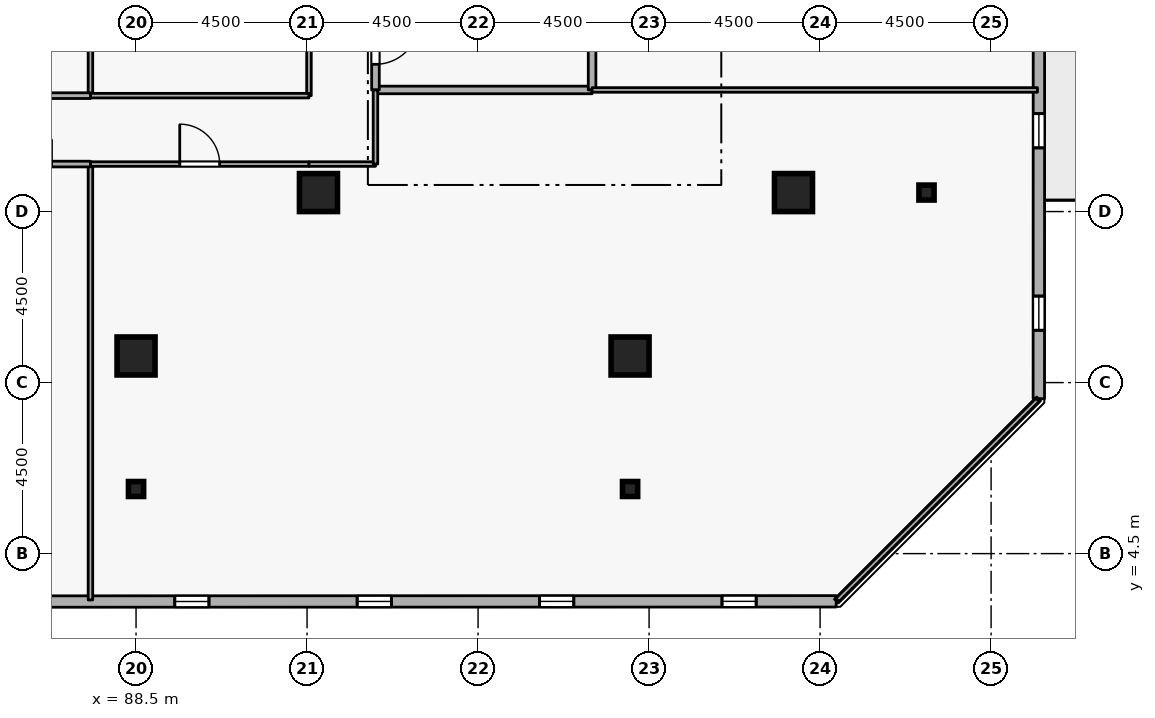
"""IFC4 building model, lengths in metres.
Left out: names, types, materials, properties, quantities, classifications, styles, units other than length and angle.
Written with IfcOpenShell. Run it as: python <this file> out.ifc"""

import sys

from ifc_helpers import new_model, si_unit, direction, frame, frame_2d, origin, origin_2d, place, context, subcontext, project, spatial, rectangle, i_section, extrude, element, fill, save


model = new_model("IFC4")
c1 = context("Model", 3, precision=1e-05, world=origin(), true_north=direction((0.0, 1.0)))
c2 = subcontext(c1, "Body", "Model", "MODEL_VIEW")
j1 = project(units=[si_unit("LENGTHUNIT", "METRE"), si_unit("PLANEANGLEUNIT", "RADIAN")], contexts=[c1])
p1 = place(None, origin())
s1 = spatial("IfcSite", under=j1, at=p1, CompositionType="ELEMENT")
p2 = place(p1, origin())
s2 = spatial("IfcBuilding", under=s1, at=p2, CompositionType="ELEMENT")
p3 = place(p2, frame((0.0, 0.0, 240.3)))
s3 = spatial("IfcBuildingStorey", under=s2, at=p3, CompositionType="ELEMENT", Elevation=240.3)
for number, where, z_axis, x_axis in (
    (1, (105.8, 14.0, 0.0), (0.0, 0.0, 1.0), (1.0, 0.0, 0.0)),
    (2, (101.5, 9.7, 0.0), (0.0, 0.0, 1.0), (1.0, 0.0, 0.0)),
    (3, (88.5, 9.7, 0.0), (0.0, 0.0, 1.0), (1.0, 0.0, 0.0)),
    (4, (93.3, 14.0, 0.0), (0.0, 0.0, 1.0), (1.0, 0.0, 0.0)),
):
    element("IfcColumn", number, at=place(p3, frame(where, z_axis=z_axis, x_axis=x_axis)), inside=s3, PredefinedType="COLUMN", context=c2, shape_type="SweptSolid", body=[
        extrude(rectangle(XDim=1.0, YDim=1.0, at=origin_2d()), origin(), (0.0, 0.0, 1.0), 3.6),
    ])
for number, where, z_axis, x_axis in (
    (5, (109.3, 14.0, 0.0), (0.0, 0.0, 1.0), (1.0, 0.0, 0.0)),
    (6, (101.5, 6.2, 0.0), (0.0, 0.0, 1.0), (1.0, 0.0, 0.0)),
    (7, (88.5, 6.2, 0.0), (0.0, 0.0, 1.0), (1.0, 0.0, 0.0)),
):
    element("IfcColumn", number, at=place(p3, frame(where, z_axis=z_axis, x_axis=x_axis)), inside=s3, PredefinedType="COLUMN", context=c2, shape_type="SweptSolid", body=[
        extrude(i_section(OverallWidth=0.399, OverallDepth=0.394, WebThickness=0.023, FlangeThickness=0.037, FilletRadius=0.015, at=origin_2d()), origin(), (0.0, 0.0, 1.0), 3.6),
    ])
p4 = place(p3, frame((73.319, 3.235, 0.0), z_axis=(0.0, 0.0, 1.0), x_axis=(0.999999963872, 0.000268805477, 0.0)))
e8 = element("IfcWall", 8, at=p4, inside=s3, PredefinedType="STANDARD", context=c2, shape_type="SweptSolid", body=[
    extrude(rectangle(XDim=33.605, YDim=0.3, at=frame_2d((16.802, 0.0))), origin(), (0.0, 0.0, 1.0), 2.7),
])
p5 = place(p4, frame((1.8, 0.0, 0.72)))
e9 = element("IfcOpeningElement", 9, at=p5, cuts=e8, PredefinedType="OPENING", context=c2, shape_type="SweptSolid", body=[
    extrude(rectangle(XDim=0.9, YDim=1.75, at=frame_2d((0.45, 0.875))), frame((0.0, 0.16, 0.0), z_axis=(0.0, -1.0, 0.0), x_axis=(1.0, 0.0, 0.0)), (0.0, 0.0, 1.0), 0.32),
])
p6 = place(p4, frame((6.6, 0.0, 0.72)))
e10 = element("IfcOpeningElement", 10, at=p6, cuts=e8, PredefinedType="OPENING", context=c2, shape_type="SweptSolid", body=[
    extrude(rectangle(XDim=0.9, YDim=1.75, at=frame_2d((0.45, 0.875))), frame((0.0, 0.16, 0.0), z_axis=(0.0, -1.0, 0.0), x_axis=(1.0, 0.0, 0.0)), (0.0, 0.0, 1.0), 0.32),
])
p7 = place(p4, frame((11.4, 0.0, 0.72)))
e11 = element("IfcOpeningElement", 11, at=p7, cuts=e8, PredefinedType="OPENING", context=c2, shape_type="SweptSolid", body=[
    extrude(rectangle(XDim=0.9, YDim=1.75, at=frame_2d((0.45, 0.875))), frame((0.0, 0.16, 0.0), z_axis=(0.0, -1.0, 0.0), x_axis=(1.0, 0.0, 0.0)), (0.0, 0.0, 1.0), 0.32),
])
p8 = place(p4, frame((16.2, 0.0, 0.72)))
e12 = element("IfcOpeningElement", 12, at=p8, cuts=e8, PredefinedType="OPENING", context=c2, shape_type="SweptSolid", body=[
    extrude(rectangle(XDim=0.9, YDim=1.75, at=frame_2d((0.45, 0.875))), frame((0.0, 0.16, 0.0), z_axis=(0.0, -1.0, 0.0), x_axis=(1.0, 0.0, 0.0)), (0.0, 0.0, 1.0), 0.32),
])
p9 = place(p4, frame((21.0, 0.0, 0.72)))
e13 = element("IfcOpeningElement", 13, at=p9, cuts=e8, PredefinedType="OPENING", context=c2, shape_type="SweptSolid", body=[
    extrude(rectangle(XDim=0.9, YDim=1.75, at=frame_2d((0.45, 0.875))), frame((0.0, 0.16, 0.0), z_axis=(0.0, -1.0, 0.0), x_axis=(1.0, 0.0, 0.0)), (0.0, 0.0, 1.0), 0.32),
])
p10 = place(p4, frame((25.8, 0.0, 0.72)))
e14 = element("IfcOpeningElement", 14, at=p10, cuts=e8, PredefinedType="OPENING", context=c2, shape_type="SweptSolid", body=[
    extrude(rectangle(XDim=0.9, YDim=1.75, at=frame_2d((0.45, 0.875))), frame((0.0, 0.16, 0.0), z_axis=(0.0, -1.0, 0.0), x_axis=(1.0, 0.0, 0.0)), (0.0, 0.0, 1.0), 0.32),
])
p11 = place(p4, frame((30.6, 0.0, 0.72)))
e15 = element("IfcOpeningElement", 15, at=p11, cuts=e8, PredefinedType="OPENING", context=c2, shape_type="SweptSolid", body=[
    extrude(rectangle(XDim=0.9, YDim=1.75, at=frame_2d((0.45, 0.875))), frame((0.0, 0.16, 0.0), z_axis=(0.0, -1.0, 0.0), x_axis=(1.0, 0.0, 0.0)), (0.0, 0.0, 1.0), 0.32),
])
p12 = place(p3, frame((112.256, 8.576, 0.0), z_axis=(0.0, 0.0, 1.0), x_axis=(0.000268805477, 0.999999963872, 0.0)))
e16 = element("IfcWall", 16, at=p12, inside=s3, PredefinedType="STANDARD", context=c2, shape_type="SweptSolid", body=[
    extrude(rectangle(XDim=33.605, YDim=0.3, at=frame_2d((16.802, 0.0))), origin(), (0.0, 0.0, 1.0), 2.7),
])
p13 = place(p12, frame((26.702, 0.0, 0.0)))
e17 = element("IfcOpeningElement", 17, at=p13, cuts=e16, PredefinedType="OPENING", context=c2, shape_type="SweptSolid", body=[
    extrude(rectangle(XDim=1.0, YDim=2.08, at=frame_2d((0.5, 1.04))), frame((0.0, 0.16, 0.0), z_axis=(0.0, -1.0, 0.0), x_axis=(1.0, 0.0, 0.0)), (0.0, 0.0, 1.0), 0.32),
])
p14 = place(p12, frame((1.8, 0.0, 0.72)))
e18 = element("IfcOpeningElement", 18, at=p14, cuts=e16, PredefinedType="OPENING", context=c2, shape_type="SweptSolid", body=[
    extrude(rectangle(XDim=0.9, YDim=1.75, at=frame_2d((0.45, 0.875))), frame((0.0, 0.16, 0.0), z_axis=(0.0, -1.0, 0.0), x_axis=(1.0, 0.0, 0.0)), (0.0, 0.0, 1.0), 0.32),
])
p15 = place(p12, frame((6.6, 0.0, 0.72)))
e19 = element("IfcOpeningElement", 19, at=p15, cuts=e16, PredefinedType="OPENING", context=c2, shape_type="SweptSolid", body=[
    extrude(rectangle(XDim=0.9, YDim=1.75, at=frame_2d((0.45, 0.875))), frame((0.0, 0.16, 0.0), z_axis=(0.0, -1.0, 0.0), x_axis=(1.0, 0.0, 0.0)), (0.0, 0.0, 1.0), 0.32),
])
p16 = place(p12, frame((11.4, 0.0, 0.72)))
e20 = element("IfcOpeningElement", 20, at=p16, cuts=e16, PredefinedType="OPENING", context=c2, shape_type="SweptSolid", body=[
    extrude(rectangle(XDim=0.9, YDim=1.75, at=frame_2d((0.45, 0.875))), frame((0.0, 0.16, 0.0), z_axis=(0.0, -1.0, 0.0), x_axis=(1.0, 0.0, 0.0)), (0.0, 0.0, 1.0), 0.32),
])
p17 = place(p12, frame((16.2, 0.0, 0.72)))
e21 = element("IfcOpeningElement", 21, at=p17, cuts=e16, PredefinedType="OPENING", context=c2, shape_type="SweptSolid", body=[
    extrude(rectangle(XDim=0.9, YDim=1.75, at=frame_2d((0.45, 0.875))), frame((0.0, 0.16, 0.0), z_axis=(0.0, -1.0, 0.0), x_axis=(1.0, 0.0, 0.0)), (0.0, 0.0, 1.0), 0.32),
])
p18 = place(p12, frame((21.0, 0.0, 0.72)))
e22 = element("IfcOpeningElement", 22, at=p18, cuts=e16, PredefinedType="OPENING", context=c2, shape_type="SweptSolid", body=[
    extrude(rectangle(XDim=0.9, YDim=1.75, at=frame_2d((0.45, 0.875))), frame((0.0, 0.16, 0.0), z_axis=(0.0, -1.0, 0.0), x_axis=(1.0, 0.0, 0.0)), (0.0, 0.0, 1.0), 0.32),
])
p19 = place(p12, frame((30.6, 0.0, 0.72)))
e23 = element("IfcOpeningElement", 23, at=p19, cuts=e16, PredefinedType="OPENING", context=c2, shape_type="SweptSolid", body=[
    extrude(rectangle(XDim=0.9, YDim=1.75, at=frame_2d((0.45, 0.875))), frame((0.0, 0.16, 0.0), z_axis=(0.0, -1.0, 0.0), x_axis=(1.0, 0.0, 0.0)), (0.0, 0.0, 1.0), 0.32),
])
p20 = place(p3, frame((94.8, 16.7, 0.0), z_axis=(0.0, 0.0, 1.0), x_axis=(1.0, 0.0, 0.0)))
e24 = element("IfcWall", 24, at=p20, inside=s3, PredefinedType="STANDARD", context=c2, shape_type="SweptSolid", body=[
    extrude(rectangle(XDim=5.7, YDim=0.2, at=frame_2d((2.85, 0.0))), origin(), (0.0, 0.0, 1.0), 3.34),
])
p21 = place(p3, frame((100.5, 16.7, 0.0), z_axis=(0.0, 0.0, 1.0), x_axis=(0.0, 1.0, 0.0)))
e25 = element("IfcWall", 25, at=p21, inside=s3, PredefinedType="STANDARD", context=c2, shape_type="SweptSolid", body=[
    extrude(rectangle(XDim=2.5, YDim=0.2, at=frame_2d((1.25, 0.0))), origin(), (0.0, 0.0, 1.0), 3.34),
])
p22 = place(p3, frame((94.8, 19.2, 0.0), z_axis=(0.0, 0.0, 1.0), x_axis=(0.0, -1.0, 0.0)))
e26 = element("IfcWall", 26, at=p22, inside=s3, PredefinedType="STANDARD", context=c2, shape_type="SweptSolid", body=[
    extrude(rectangle(XDim=2.5, YDim=0.2, at=frame_2d((1.25, 0.0))), origin(), (0.0, 0.0, 1.0), 3.34),
])
p23 = place(p22, frame((0.675, 0.0, 0.0)))
e27 = element("IfcOpeningElement", 27, at=p23, cuts=e26, PredefinedType="OPENING", context=c2, shape_type="SweptSolid", body=[
    extrude(rectangle(XDim=1.15, YDim=2.1, at=frame_2d((0.575, 1.05))), frame((0.0, 0.11, 0.0), z_axis=(0.0, -1.0, 0.0), x_axis=(1.0, 0.0, 0.0)), (0.0, 0.0, 1.0), 0.22),
])
p24 = place(p3, frame((87.3, 3.28, 0.0), z_axis=(0.0, 0.0, 1.0), x_axis=(0.0, 1.0, 0.0)))
e28 = element("IfcWall", 28, at=p24, inside=s3, PredefinedType="PARTITIONING", context=c2, shape_type="SweptSolid", body=[
    extrude(rectangle(XDim=11.47, YDim=0.12, at=frame_2d((5.735, 0.0))), origin(), (0.0, 0.0, 1.0), 3.34),
])
p25 = place(p3, frame((87.3, 14.75, 0.0), z_axis=(0.0, 0.0, 1.0), x_axis=(1.0, 0.0, 0.0)))
e29 = element("IfcWall", 29, at=p25, inside=s3, PredefinedType="PARTITIONING", context=c2, shape_type="SweptSolid", body=[
    extrude(rectangle(XDim=5.75, YDim=0.12, at=frame_2d((2.875, 0.0))), origin(), (0.0, 0.0, 1.0), 3.34),
])
p26 = place(p25, frame((2.35, 0.0, 0.0)))
e30 = element("IfcOpeningElement", 30, at=p26, cuts=e29, PredefinedType="OPENING", context=c2, shape_type="SweptSolid", body=[
    extrude(rectangle(XDim=1.05, YDim=2.1, at=frame_2d((0.525, 1.05))), frame((0.0, 0.07, 0.0), z_axis=(0.0, -1.0, 0.0), x_axis=(1.0, 0.0, 0.0)), (0.0, 0.0, 1.0), 0.14),
])
p27 = place(p3, frame((93.05, 14.75, 0.0), z_axis=(0.0, 0.0, 1.0), x_axis=(1.0, 0.0, 0.0)))
e31 = element("IfcWall", 31, at=p27, inside=s3, PredefinedType="PARTITIONING", context=c2, shape_type="SweptSolid", body=[
    extrude(rectangle(XDim=1.75, YDim=0.12, at=frame_2d((0.875, 0.0))), origin(), (0.0, 0.0, 1.0), 3.34),
])
p28 = place(p3, frame((94.8, 14.75, 0.0), z_axis=(0.0, 0.0, 1.0), x_axis=(0.0, 1.0, 0.0)))
e32 = element("IfcWall", 32, at=p28, inside=s3, PredefinedType="PARTITIONING", context=c2, shape_type="SweptSolid", body=[
    extrude(rectangle(XDim=1.95, YDim=0.12, at=frame_2d((0.975, 0.0))), origin(), (0.0, 0.0, 1.0), 3.34),
])
p29 = place(p3, frame((100.5, 16.7, 0.0), z_axis=(0.0, 0.0, 1.0), x_axis=(1.0, 0.0, 0.0)))
e33 = element("IfcWall", 33, at=p29, inside=s3, PredefinedType="PARTITIONING", context=c2, shape_type="SweptSolid", body=[
    extrude(rectangle(XDim=11.72, YDim=0.12, at=frame_2d((5.86, 0.0))), origin(), (0.0, 0.0, 1.0), 3.34),
])
p30 = place(p3, frame((112.22, 8.544, 0.0), z_axis=(0.0, 0.0, 1.0), x_axis=(-0.707106781187, -0.707106781187, 0.0)))
e34 = element("IfcWall", 34, at=p30, inside=s3, PredefinedType="PARTITIONING", context=c2, shape_type="SweptSolid", body=[
    extrude(rectangle(XDim=7.444, YDim=0.12, at=frame_2d((3.722, 0.0))), origin(), (0.0, 0.0, 1.0), 3.34),
])
p31 = place(p3, frame((83.95, 14.75, 0.0), z_axis=(0.0, 0.0, 1.0), x_axis=(1.0, 0.0, 0.0)))
e35 = element("IfcWall", 35, at=p31, inside=s3, PredefinedType="PARTITIONING", context=c2, shape_type="SweptSolid", body=[
    extrude(rectangle(XDim=3.35, YDim=0.15, at=frame_2d((1.675, 0.0))), origin(), (0.0, 0.0, 1.0), 3.34),
])
p32 = place(p31, frame((1.025, 0.0, 0.0)))
e36 = element("IfcOpeningElement", 36, at=p32, cuts=e35, PredefinedType="OPENING", context=c2, shape_type="SweptSolid", body=[
    extrude(rectangle(XDim=1.3, YDim=2.12, at=frame_2d((0.65, 1.06))), frame((0.0, 0.085, 0.0), z_axis=(0.0, -1.0, 0.0), x_axis=(1.0, 0.0, 0.0)), (0.0, 0.0, 1.0), 0.17),
])
p33 = place(p3, frame((87.3, 16.55, 0.0), z_axis=(0.0, 0.0, 1.0), x_axis=(0.0, 1.0, 0.0)))
e37 = element("IfcWall", 37, at=p33, inside=s3, PredefinedType="PARTITIONING", context=c2, shape_type="SweptSolid", body=[
    extrude(rectangle(XDim=5.85, YDim=0.12, at=frame_2d((2.925, 0.0))), origin(), (0.0, 0.0, 1.0), 3.34),
])
p34 = place(p3, frame((93.05, 22.4, 0.0), z_axis=(0.0, 0.0, 1.0), x_axis=(0.0, -1.0, 0.0)))
e38 = element("IfcWall", 38, at=p34, inside=s3, PredefinedType="PARTITIONING", context=c2, shape_type="SweptSolid", body=[
    extrude(rectangle(XDim=5.85, YDim=0.12, at=frame_2d((2.925, 0.0))), origin(), (0.0, 0.0, 1.0), 3.34),
])
p35 = place(p34, frame((2.45, 0.0, 0.0)))
e39 = element("IfcOpeningElement", 39, at=p35, cuts=e38, PredefinedType="OPENING", context=c2, shape_type="SweptSolid", body=[
    extrude(rectangle(XDim=0.95, YDim=2.1, at=frame_2d((0.475, 1.05))), frame((0.0, 0.07, 0.0), z_axis=(0.0, -1.0, 0.0), x_axis=(1.0, 0.0, 0.0)), (0.0, 0.0, 1.0), 0.14),
])
p36 = place(p3, frame((93.05, 16.55, 0.0), z_axis=(0.0, 0.0, 1.0), x_axis=(-1.0, 0.0, 0.0)))
e40 = element("IfcWall", 40, at=p36, inside=s3, PredefinedType="PARTITIONING", context=c2, shape_type="SweptSolid", body=[
    extrude(rectangle(XDim=5.75, YDim=0.12, at=frame_2d((2.875, 0.0))), origin(), (0.0, 0.0, 1.0), 3.34),
])
p37 = place(p3, frame((87.3, 16.55, 0.0), z_axis=(0.0, 0.0, 1.0), x_axis=(-1.0, 0.0, 0.0)))
e41 = element("IfcWall", 41, at=p37, inside=s3, PredefinedType="PARTITIONING", context=c2, shape_type="SweptSolid", body=[
    extrude(rectangle(XDim=3.35, YDim=0.15, at=frame_2d((1.675, 0.0))), origin(), (0.0, 0.0, 1.0), 3.34),
])
p38 = place(p8, origin())
e42 = element("IfcWindow", 42, at=p38, inside=s3, PartitioningType="SINGLE_PANEL", PredefinedType="WINDOW", context=c2, shape_type="SweptSolid", body=[
    extrude(rectangle(XDim=0.9, YDim=1.75, at=frame_2d((0.45, 0.875))), frame((0.0, 0.03, 0.0), z_axis=(0.0, -1.0, 0.0), x_axis=(1.0, 0.0, 0.0)), (0.0, 0.0, 1.0), 0.06),
])
fill(e12, e42)
p39 = place(p9, origin())
e43 = element("IfcWindow", 43, at=p39, inside=s3, PartitioningType="SINGLE_PANEL", PredefinedType="WINDOW", context=c2, shape_type="SweptSolid", body=[
    extrude(rectangle(XDim=0.9, YDim=1.75, at=frame_2d((0.45, 0.875))), frame((0.0, 0.03, 0.0), z_axis=(0.0, -1.0, 0.0), x_axis=(1.0, 0.0, 0.0)), (0.0, 0.0, 1.0), 0.06),
])
fill(e13, e43)
p40 = place(p10, origin())
e44 = element("IfcWindow", 44, at=p40, inside=s3, PartitioningType="SINGLE_PANEL", PredefinedType="WINDOW", context=c2, shape_type="SweptSolid", body=[
    extrude(rectangle(XDim=0.9, YDim=1.75, at=frame_2d((0.45, 0.875))), frame((0.0, 0.03, 0.0), z_axis=(0.0, -1.0, 0.0), x_axis=(1.0, 0.0, 0.0)), (0.0, 0.0, 1.0), 0.06),
])
fill(e14, e44)
p41 = place(p11, origin())
e45 = element("IfcWindow", 45, at=p41, inside=s3, PartitioningType="SINGLE_PANEL", PredefinedType="WINDOW", context=c2, shape_type="SweptSolid", body=[
    extrude(rectangle(XDim=0.9, YDim=1.75, at=frame_2d((0.45, 0.875))), frame((0.0, 0.03, 0.0), z_axis=(0.0, -1.0, 0.0), x_axis=(1.0, 0.0, 0.0)), (0.0, 0.0, 1.0), 0.06),
])
fill(e15, e45)
p42 = place(p14, origin())
e46 = element("IfcWindow", 46, at=p42, inside=s3, PartitioningType="SINGLE_PANEL", PredefinedType="WINDOW", context=c2, shape_type="SweptSolid", body=[
    extrude(rectangle(XDim=0.9, YDim=1.75, at=frame_2d((0.45, 0.875))), frame((0.0, 0.03, 0.0), z_axis=(0.0, -1.0, 0.0), x_axis=(1.0, 0.0, 0.0)), (0.0, 0.0, 1.0), 0.06),
])
fill(e18, e46)
p43 = place(p15, origin())
e47 = element("IfcWindow", 47, at=p43, inside=s3, PartitioningType="SINGLE_PANEL", PredefinedType="WINDOW", context=c2, shape_type="SweptSolid", body=[
    extrude(rectangle(XDim=0.9, YDim=1.75, at=frame_2d((0.45, 0.875))), frame((0.0, 0.03, 0.0), z_axis=(0.0, -1.0, 0.0), x_axis=(1.0, 0.0, 0.0)), (0.0, 0.0, 1.0), 0.06),
])
fill(e19, e47)
p44 = place(p23, origin())
e48 = element("IfcDoor", 48, at=p44, inside=s3, OperationType="SINGLE_SWING_LEFT", PredefinedType="DOOR", context=c2, shape_type="SweptSolid", body=[
    extrude(rectangle(XDim=1.15, YDim=2.1, at=frame_2d((0.575, 1.05))), frame((0.0, 0.025, 0.0), z_axis=(0.0, -1.0, 0.0), x_axis=(1.0, 0.0, 0.0)), (0.0, 0.0, 1.0), 0.05),
])
fill(e27, e48)
p45 = place(p26, origin())
e49 = element("IfcDoor", 49, at=p45, inside=s3, OperationType="SINGLE_SWING_LEFT", PredefinedType="DOOR", context=c2, shape_type="SweptSolid", body=[
    extrude(rectangle(XDim=1.05, YDim=2.1, at=frame_2d((0.525, 1.05))), frame((0.0, 0.025, 0.0), z_axis=(0.0, -1.0, 0.0), x_axis=(1.0, 0.0, 0.0)), (0.0, 0.0, 1.0), 0.05),
])
fill(e30, e49)
save(model, sys.argv[1])
